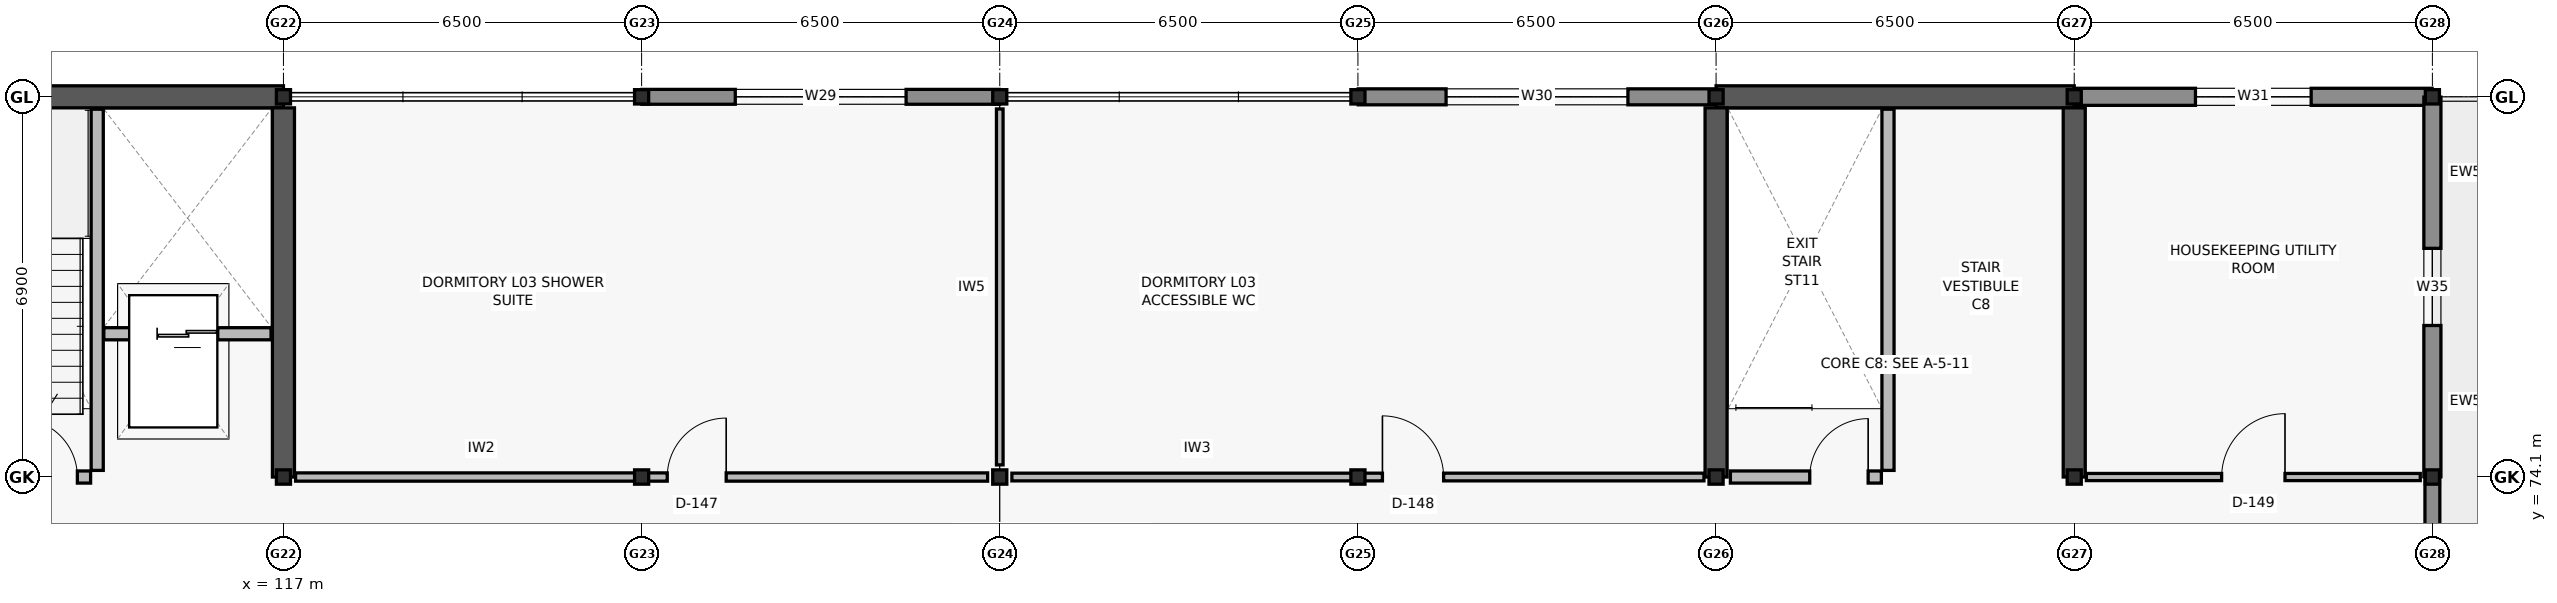
"""IFC4 building model, lengths in metres.
Left out: names, types, materials, properties, quantities, classifications, styles, units other than length and angle.
Written with IfcOpenShell. Run it as: python <this file> out.ifc"""

import sys

from ifc_helpers import new_model, si_unit, direction, frame, frame_2d, origin, origin_2d, place, context, subcontext, project, spatial, rectangle, i_section, extrude, element, fill, save


model = new_model("IFC4")
c1 = context("Model", 3, precision=1e-05, world=origin(), true_north=direction((0.0, 1.0)))
c2 = subcontext(c1, "Body", "Model", "MODEL_VIEW")
j1 = project(units=[si_unit("LENGTHUNIT", "METRE"), si_unit("PLANEANGLEUNIT", "RADIAN")], contexts=[c1])
p1 = place(None, origin())
s1 = spatial("IfcSite", under=j1, at=p1, CompositionType="ELEMENT")
p2 = place(p1, origin())
s2 = spatial("IfcBuilding", under=s1, at=p2, CompositionType="ELEMENT")
p3 = place(p2, frame((0.0, 0.0, 13.5)))
s3 = spatial("IfcBuildingStorey", under=s2, at=p3, CompositionType="ELEMENT", Elevation=13.5)
for number, where, z_axis, x_axis in (
    (1, (117.0, 74.1, 0.0), (0.0, 0.0, 1.0), (1.0, 0.0, 0.0)),
    (2, (117.0, 81.0, 0.0), (0.0, 0.0, 1.0), (1.0, 0.0, 0.0)),
    (3, (123.5, 74.1, 0.0), (0.0, 0.0, 1.0), (1.0, 0.0, 0.0)),
    (4, (123.5, 81.0, 0.0), (0.0, 0.0, 1.0), (1.0, 0.0, 0.0)),
    (5, (130.0, 74.1, 0.0), (0.0, 0.0, 1.0), (1.0, 0.0, 0.0)),
    (6, (130.0, 81.0, 0.0), (0.0, 0.0, 1.0), (1.0, 0.0, 0.0)),
    (7, (136.5, 74.1, 0.0), (0.0, 0.0, 1.0), (1.0, 0.0, 0.0)),
    (8, (136.5, 81.0, 0.0), (0.0, 0.0, 1.0), (1.0, 0.0, 0.0)),
    (9, (143.0, 74.1, 0.0), (0.0, 0.0, 1.0), (1.0, 0.0, 0.0)),
    (10, (143.0, 81.0, 0.0), (0.0, 0.0, 1.0), (1.0, 0.0, 0.0)),
    (11, (149.5, 74.1, 0.0), (0.0, 0.0, 1.0), (1.0, 0.0, 0.0)),
    (12, (149.5, 81.0, 0.0), (0.0, 0.0, 1.0), (1.0, 0.0, 0.0)),
    (13, (156.0, 74.1, 0.0), (0.0, 0.0, 1.0), (1.0, 0.0, 0.0)),
    (14, (156.0, 81.0, 0.0), (0.0, 0.0, 1.0), (1.0, 0.0, 0.0)),
):
    element("IfcColumn", number, at=place(p3, frame(where, z_axis=z_axis, x_axis=x_axis)), inside=s3, PredefinedType="COLUMN", context=c2, shape_type="SweptSolid", body=[
        extrude(i_section(OverallWidth=0.256, OverallDepth=0.26, WebThickness=0.01, FlangeThickness=0.017, FilletRadius=0.013, at=origin_2d()), origin(), (0.0, 0.0, 1.0), 3.9),
    ])
p4 = place(p3, frame((110.5, 81.0, 0.0), z_axis=(0.0, 0.0, 1.0), x_axis=(1.0, 0.0, 0.0)))
e15 = element("IfcWall", 15, at=p4, inside=s3, PredefinedType="SHEAR", context=c2, shape_type="SweptSolid", body=[
    extrude(rectangle(XDim=6.5, YDim=0.4, at=frame_2d((3.25, 0.0))), origin(), (0.0, 0.0, 1.0), 3.66),
])
p5 = place(p3, frame((117.0, 74.1, 0.0), z_axis=(0.0, 0.0, 1.0), x_axis=(0.0, 1.0, 0.0)))
e16 = element("IfcWall", 16, at=p5, inside=s3, PredefinedType="SHEAR", context=c2, shape_type="SweptSolid", body=[
    extrude(rectangle(XDim=6.7, YDim=0.4, at=frame_2d((3.35, 0.0))), origin(), (0.0, 0.0, 1.0), 3.66),
])
p6 = place(p3, frame((143.0, 81.0, 0.0), z_axis=(0.0, 0.0, 1.0), x_axis=(1.0, 0.0, 0.0)))
e17 = element("IfcWall", 17, at=p6, inside=s3, PredefinedType="SHEAR", context=c2, shape_type="SweptSolid", body=[
    extrude(rectangle(XDim=6.5, YDim=0.4, at=frame_2d((3.25, 0.0))), origin(), (0.0, 0.0, 1.0), 3.66),
])
for number, where, z_axis, x_axis in (
    (18, (143.0, 74.1, 0.0), (0.0, 0.0, 1.0), (0.0, 1.0, 0.0)),
    (19, (149.5, 74.1, 0.0), (0.0, 0.0, 1.0), (0.0, 1.0, 0.0)),
):
    element("IfcWall", number, at=place(p3, frame(where, z_axis=z_axis, x_axis=x_axis)), inside=s3, PredefinedType="SHEAR", context=c2, shape_type="SweptSolid", body=[
        extrude(rectangle(XDim=6.7, YDim=0.4, at=frame_2d((3.35, 0.0))), origin(), (0.0, 0.0, 1.0), 3.66),
    ])
p7 = place(p3, frame((123.505, 81.0, 0.0), z_axis=(0.0, 0.0, 1.0), x_axis=(1.0, 0.0, 0.0)))
e20 = element("IfcWall", 20, at=p7, inside=s3, PredefinedType="SOLIDWALL", context=c2, shape_type="SweptSolid", body=[
    extrude(rectangle(XDim=6.49, YDim=0.27, at=frame_2d((3.245, 0.0))), origin(), (0.0, 0.0, 1.0), 3.02),
])
p8 = place(p7, frame((1.695, 0.0, 0.8)))
e21 = element("IfcOpeningElement", 21, at=p8, cuts=e20, PredefinedType="OPENING", context=c2, shape_type="SweptSolid", body=[
    extrude(rectangle(XDim=3.1, YDim=1.15, at=frame_2d((1.55, 0.575))), frame((0.0, 0.145, 0.0), z_axis=(0.0, -1.0, 0.0), x_axis=(1.0, 0.0, 0.0)), (0.0, 0.0, 1.0), 0.29),
])
p9 = place(p3, frame((136.505, 81.0, 0.0), z_axis=(0.0, 0.0, 1.0), x_axis=(1.0, 0.0, 0.0)))
e22 = element("IfcWall", 22, at=p9, inside=s3, PredefinedType="SOLIDWALL", context=c2, shape_type="SweptSolid", body=[
    extrude(rectangle(XDim=6.49, YDim=0.29, at=frame_2d((3.245, 0.0))), origin(), (0.0, 0.0, 1.0), 3.02),
])
p10 = place(p9, frame((1.595, 0.0, 0.8)))
e23 = element("IfcOpeningElement", 23, at=p10, cuts=e22, PredefinedType="OPENING", context=c2, shape_type="SweptSolid", body=[
    extrude(rectangle(XDim=3.3, YDim=1.25, at=frame_2d((1.65, 0.625))), frame((0.0, 0.155, 0.0), z_axis=(0.0, -1.0, 0.0), x_axis=(1.0, 0.0, 0.0)), (0.0, 0.0, 1.0), 0.31),
])
p11 = place(p3, frame((149.505, 81.0, 0.0), z_axis=(0.0, 0.0, 1.0), x_axis=(1.0, 0.0, 0.0)))
e24 = element("IfcWall", 24, at=p11, inside=s3, PredefinedType="SOLIDWALL", context=c2, shape_type="SweptSolid", body=[
    extrude(rectangle(XDim=6.49, YDim=0.31, at=frame_2d((3.245, 0.0))), origin(), (0.0, 0.0, 1.0), 3.02),
])
p12 = place(p11, frame((2.195, 0.0, 0.8)))
e25 = element("IfcOpeningElement", 25, at=p12, cuts=e24, PredefinedType="OPENING", context=c2, shape_type="SweptSolid", body=[
    extrude(rectangle(XDim=2.1, YDim=1.25, at=frame_2d((1.05, 0.625))), frame((0.0, 0.165, 0.0), z_axis=(0.0, -1.0, 0.0), x_axis=(1.0, 0.0, 0.0)), (0.0, 0.0, 1.0), 0.33),
])
p13 = place(p3, frame((156.0, 74.095, 0.0), z_axis=(0.0, 0.0, 1.0), x_axis=(0.0, -1.0, 0.0)))
e26 = element("IfcWall", 26, at=p13, inside=s3, PredefinedType="SOLIDWALL", context=c2, shape_type="SweptSolid", body=[
    extrude(rectangle(XDim=6.89, YDim=0.27, at=frame_2d((3.445, 0.0))), origin(), (0.0, 0.0, 1.0), 3.02),
])
p14 = place(p13, frame((2.935, 0.0, 0.0)))
e27 = element("IfcOpeningElement", 27, at=p14, cuts=e26, PredefinedType="OPENING", context=c2, shape_type="SweptSolid", body=[
    extrude(rectangle(XDim=1.02, YDim=2.14, at=frame_2d((0.51, 1.07))), frame((0.0, 0.145, 0.0), z_axis=(0.0, -1.0, 0.0), x_axis=(1.0, 0.0, 0.0)), (0.0, 0.0, 1.0), 0.29),
])
p15 = place(p3, frame((156.0, 80.995, 0.0), z_axis=(0.0, 0.0, 1.0), x_axis=(0.0, -1.0, 0.0)))
e28 = element("IfcWall", 28, at=p15, inside=s3, PredefinedType="SOLIDWALL", context=c2, shape_type="SweptSolid", body=[
    extrude(rectangle(XDim=6.89, YDim=0.31, at=frame_2d((3.445, 0.0))), origin(), (0.0, 0.0, 1.0), 3.02),
])
p16 = place(p15, frame((2.745, 0.0, 0.8)))
e29 = element("IfcOpeningElement", 29, at=p16, cuts=e28, PredefinedType="OPENING", context=c2, shape_type="SweptSolid", body=[
    extrude(rectangle(XDim=1.4, YDim=1.5, at=frame_2d((0.7, 0.75))), frame((0.0, 0.165, 0.0), z_axis=(0.0, -1.0, 0.0), x_axis=(1.0, 0.0, 0.0)), (0.0, 0.0, 1.0), 0.33),
])
p17 = place(p3, frame((113.62, 74.22, 0.0), z_axis=(0.0, 0.0, 1.0), x_axis=(0.0, 1.0, 0.0)))
e30 = element("IfcWall", 30, at=p17, inside=s3, PredefinedType="SOLIDWALL", context=c2, shape_type="SweptSolid", body=[
    extrude(rectangle(XDim=6.555, YDim=0.22, at=frame_2d((3.277, 0.0))), origin(), (0.0, 0.0, 1.0), 3.66),
])
p18 = place(p3, frame((110.76, 74.1, 0.0), z_axis=(0.0, 0.0, 1.0), x_axis=(1.0, 0.0, 0.0)))
e31 = element("IfcWall", 31, at=p18, inside=s3, PredefinedType="SOLIDWALL", context=c2, shape_type="SweptSolid", body=[
    extrude(rectangle(XDim=2.74, YDim=0.22, at=frame_2d((1.37, 0.0))), origin(), (0.0, 0.0, 1.0), 3.02),
])
p19 = place(p18, frame((1.44, 0.0, 0.0)))
e32 = element("IfcOpeningElement", 32, at=p19, cuts=e31, PredefinedType="OPENING", context=c2, shape_type="SweptSolid", body=[
    extrude(rectangle(XDim=1.06, YDim=2.1, at=frame_2d((0.53, 1.05))), frame((0.0, 0.12, 0.0), z_axis=(0.0, -1.0, 0.0), x_axis=(1.0, 0.0, 0.0)), (0.0, 0.0, 1.0), 0.24),
])
p20 = place(p3, frame((113.74, 76.7, 0.0), z_axis=(0.0, 0.0, 1.0), x_axis=(1.0, 0.0, 0.0)))
e33 = element("IfcWall", 33, at=p20, inside=s3, PredefinedType="SOLIDWALL", context=c2, shape_type="SweptSolid", body=[
    extrude(rectangle(XDim=3.035, YDim=0.22, at=frame_2d((1.518, 0.0))), origin(), (0.0, 0.0, 1.0), 3.66),
])
p21 = place(p20, frame((0.968, 0.0, 0.0)))
e34 = element("IfcOpeningElement", 34, at=p21, cuts=e33, PredefinedType="OPENING", context=c2, shape_type="SweptSolid", body=[
    extrude(rectangle(XDim=1.1, YDim=2.1, at=frame_2d((0.55, 1.05))), frame((0.0, 0.12, 0.0), z_axis=(0.0, -1.0, 0.0), x_axis=(1.0, 0.0, 0.0)), (0.0, 0.0, 1.0), 0.24),
])
p22 = place(p3, frame((146.12, 74.22, 0.0), z_axis=(0.0, 0.0, 1.0), x_axis=(0.0, 1.0, 0.0)))
e35 = element("IfcWall", 35, at=p22, inside=s3, PredefinedType="SOLIDWALL", context=c2, shape_type="SweptSolid", body=[
    extrude(rectangle(XDim=6.555, YDim=0.22, at=frame_2d((3.277, 0.0))), origin(), (0.0, 0.0, 1.0), 3.66),
])
p23 = place(p3, frame((143.26, 74.1, 0.0), z_axis=(0.0, 0.0, 1.0), x_axis=(1.0, 0.0, 0.0)))
e36 = element("IfcWall", 36, at=p23, inside=s3, PredefinedType="SOLIDWALL", context=c2, shape_type="SweptSolid", body=[
    extrude(rectangle(XDim=2.74, YDim=0.22, at=frame_2d((1.37, 0.0))), origin(), (0.0, 0.0, 1.0), 3.02),
])
p24 = place(p23, frame((1.44, 0.0, 0.0)))
e37 = element("IfcOpeningElement", 37, at=p24, cuts=e36, PredefinedType="OPENING", context=c2, shape_type="SweptSolid", body=[
    extrude(rectangle(XDim=1.06, YDim=2.1, at=frame_2d((0.53, 1.05))), frame((0.0, 0.12, 0.0), z_axis=(0.0, -1.0, 0.0), x_axis=(1.0, 0.0, 0.0)), (0.0, 0.0, 1.0), 0.24),
])
p25 = place(p3, frame((117.22, 74.1, 0.0), z_axis=(0.0, 0.0, 1.0), x_axis=(1.0, 0.0, 0.0)))
e38 = element("IfcWall", 38, at=p25, inside=s3, PredefinedType="PARTITIONING", context=c2, shape_type="SweptSolid", body=[
    extrude(rectangle(XDim=12.56, YDim=0.15, at=frame_2d((6.28, 0.0))), origin(), (0.0, 0.0, 1.0), 3.0),
])
p26 = place(p25, frame((6.745, 0.0, 0.0)))
e39 = element("IfcOpeningElement", 39, at=p26, cuts=e38, PredefinedType="OPENING", context=c2, shape_type="SweptSolid", body=[
    extrude(rectangle(XDim=1.07, YDim=2.08, at=frame_2d((0.535, 1.04))), frame((0.0, 0.085, 0.0), z_axis=(0.0, -1.0, 0.0), x_axis=(1.0, 0.0, 0.0)), (0.0, 0.0, 1.0), 0.17),
])
p27 = place(p3, frame((130.22, 74.1, 0.0), z_axis=(0.0, 0.0, 1.0), x_axis=(1.0, 0.0, 0.0)))
e40 = element("IfcWall", 40, at=p27, inside=s3, PredefinedType="PARTITIONING", context=c2, shape_type="SweptSolid", body=[
    extrude(rectangle(XDim=12.56, YDim=0.14, at=frame_2d((6.28, 0.0))), origin(), (0.0, 0.0, 1.0), 3.0),
])
p28 = place(p27, frame((6.725, 0.0, 0.0)))
e41 = element("IfcOpeningElement", 41, at=p28, cuts=e40, PredefinedType="OPENING", context=c2, shape_type="SweptSolid", body=[
    extrude(rectangle(XDim=1.11, YDim=2.1, at=frame_2d((0.555, 1.05))), frame((0.0, 0.08, 0.0), z_axis=(0.0, -1.0, 0.0), x_axis=(1.0, 0.0, 0.0)), (0.0, 0.0, 1.0), 0.16),
])
p29 = place(p3, frame((149.72, 74.1, 0.0), z_axis=(0.0, 0.0, 1.0), x_axis=(1.0, 0.0, 0.0)))
e42 = element("IfcWall", 42, at=p29, inside=s3, PredefinedType="PARTITIONING", context=c2, shape_type="SweptSolid", body=[
    extrude(rectangle(XDim=6.06, YDim=0.13, at=frame_2d((3.03, 0.0))), origin(), (0.0, 0.0, 1.0), 3.0),
])
p30 = place(p29, frame((2.455, 0.0, 0.0)))
e43 = element("IfcOpeningElement", 43, at=p30, cuts=e42, PredefinedType="OPENING", context=c2, shape_type="SweptSolid", body=[
    extrude(rectangle(XDim=1.15, YDim=2.12, at=frame_2d((0.575, 1.06))), frame((0.0, 0.075, 0.0), z_axis=(0.0, -1.0, 0.0), x_axis=(1.0, 0.0, 0.0)), (0.0, 0.0, 1.0), 0.15),
])
p31 = place(p3, frame((130.0, 74.32, 0.0), z_axis=(0.0, 0.0, 1.0), x_axis=(0.0, 1.0, 0.0)))
e44 = element("IfcWall", 44, at=p31, inside=s3, PredefinedType="PARTITIONING", context=c2, shape_type="SweptSolid", body=[
    extrude(rectangle(XDim=6.46, YDim=0.12, at=frame_2d((3.23, 0.0))), origin(), (0.0, 0.0, 1.0), 3.0),
])
p32 = place(p8, origin())
e45 = element("IfcWindow", 45, at=p32, inside=s3, PartitioningType="TRIPLE_PANEL_VERTICAL", PredefinedType="WINDOW", context=c2, shape_type="SweptSolid", body=[
    extrude(rectangle(XDim=3.1, YDim=1.15, at=frame_2d((1.55, 0.575))), frame((0.0, 0.03, 0.0), z_axis=(0.0, -1.0, 0.0), x_axis=(1.0, 0.0, 0.0)), (0.0, 0.0, 1.0), 0.06),
])
fill(e21, e45)
p33 = place(p10, origin())
e46 = element("IfcWindow", 46, at=p33, inside=s3, PartitioningType="TRIPLE_PANEL_VERTICAL", PredefinedType="WINDOW", context=c2, shape_type="SweptSolid", body=[
    extrude(rectangle(XDim=3.3, YDim=1.25, at=frame_2d((1.65, 0.625))), frame((0.0, 0.03, 0.0), z_axis=(0.0, -1.0, 0.0), x_axis=(1.0, 0.0, 0.0)), (0.0, 0.0, 1.0), 0.06),
])
fill(e23, e46)
p34 = place(p12, origin())
e47 = element("IfcWindow", 47, at=p34, inside=s3, PartitioningType="DOUBLE_PANEL_VERTICAL", PredefinedType="WINDOW", context=c2, shape_type="SweptSolid", body=[
    extrude(rectangle(XDim=2.1, YDim=1.25, at=frame_2d((1.05, 0.625))), frame((0.0, 0.03, 0.0), z_axis=(0.0, -1.0, 0.0), x_axis=(1.0, 0.0, 0.0)), (0.0, 0.0, 1.0), 0.06),
])
fill(e25, e47)
p35 = place(p16, origin())
e48 = element("IfcWindow", 48, at=p35, inside=s3, PartitioningType="SINGLE_PANEL", PredefinedType="WINDOW", context=c2, shape_type="SweptSolid", body=[
    extrude(rectangle(XDim=1.4, YDim=1.5, at=frame_2d((0.7, 0.75))), frame((0.0, 0.03, 0.0), z_axis=(0.0, -1.0, 0.0), x_axis=(1.0, 0.0, 0.0)), (0.0, 0.0, 1.0), 0.06),
])
fill(e29, e48)
p36 = place(p19, origin())
e49 = element("IfcDoor", 49, at=p36, inside=s3, OperationType="SINGLE_SWING_LEFT", PredefinedType="DOOR", context=c2, shape_type="SweptSolid", body=[
    extrude(rectangle(XDim=1.06, YDim=2.1, at=frame_2d((0.53, 1.05))), frame((0.0, 0.025, 0.0), z_axis=(0.0, -1.0, 0.0), x_axis=(1.0, 0.0, 0.0)), (0.0, 0.0, 1.0), 0.05),
])
fill(e32, e49)
p37 = place(p21, origin())
e50 = element("IfcDoor", 50, at=p37, inside=s3, OperationType="DOUBLE_DOOR_SLIDING", PredefinedType="DOOR", context=c2, shape_type="SweptSolid", body=[
    extrude(rectangle(XDim=1.1, YDim=2.1, at=frame_2d((0.55, 1.05))), frame((0.0, 0.025, 0.0), z_axis=(0.0, -1.0, 0.0), x_axis=(1.0, 0.0, 0.0)), (0.0, 0.0, 1.0), 0.05),
])
fill(e34, e50)
p38 = place(p24, origin())
e51 = element("IfcDoor", 51, at=p38, inside=s3, OperationType="SINGLE_SWING_RIGHT", PredefinedType="DOOR", context=c2, shape_type="SweptSolid", body=[
    extrude(rectangle(XDim=1.06, YDim=2.1, at=frame_2d((0.53, 1.05))), frame((0.0, 0.025, 0.0), z_axis=(0.0, -1.0, 0.0), x_axis=(1.0, 0.0, 0.0)), (0.0, 0.0, 1.0), 0.05),
])
fill(e37, e51)
p39 = place(p26, origin())
e52 = element("IfcDoor", 52, at=p39, inside=s3, OperationType="SINGLE_SWING_RIGHT", PredefinedType="DOOR", context=c2, shape_type="SweptSolid", body=[
    extrude(rectangle(XDim=1.07, YDim=2.08, at=frame_2d((0.535, 1.04))), frame((0.0, 0.025, 0.0), z_axis=(0.0, -1.0, 0.0), x_axis=(1.0, 0.0, 0.0)), (0.0, 0.0, 1.0), 0.05),
])
fill(e39, e52)
p40 = place(p28, origin())
e53 = element("IfcDoor", 53, at=p40, inside=s3, OperationType="SINGLE_SWING_LEFT", PredefinedType="DOOR", context=c2, shape_type="SweptSolid", body=[
    extrude(rectangle(XDim=1.11, YDim=2.1, at=frame_2d((0.555, 1.05))), frame((0.0, 0.025, 0.0), z_axis=(0.0, -1.0, 0.0), x_axis=(1.0, 0.0, 0.0)), (0.0, 0.0, 1.0), 0.05),
])
fill(e41, e53)
p41 = place(p30, origin())
e54 = element("IfcDoor", 54, at=p41, inside=s3, OperationType="SINGLE_SWING_RIGHT", PredefinedType="DOOR", context=c2, shape_type="SweptSolid", body=[
    extrude(rectangle(XDim=1.15, YDim=2.12, at=frame_2d((0.575, 1.06))), frame((0.0, 0.025, 0.0), z_axis=(0.0, -1.0, 0.0), x_axis=(1.0, 0.0, 0.0)), (0.0, 0.0, 1.0), 0.05),
])
fill(e43, e54)
save(model, sys.argv[1])
